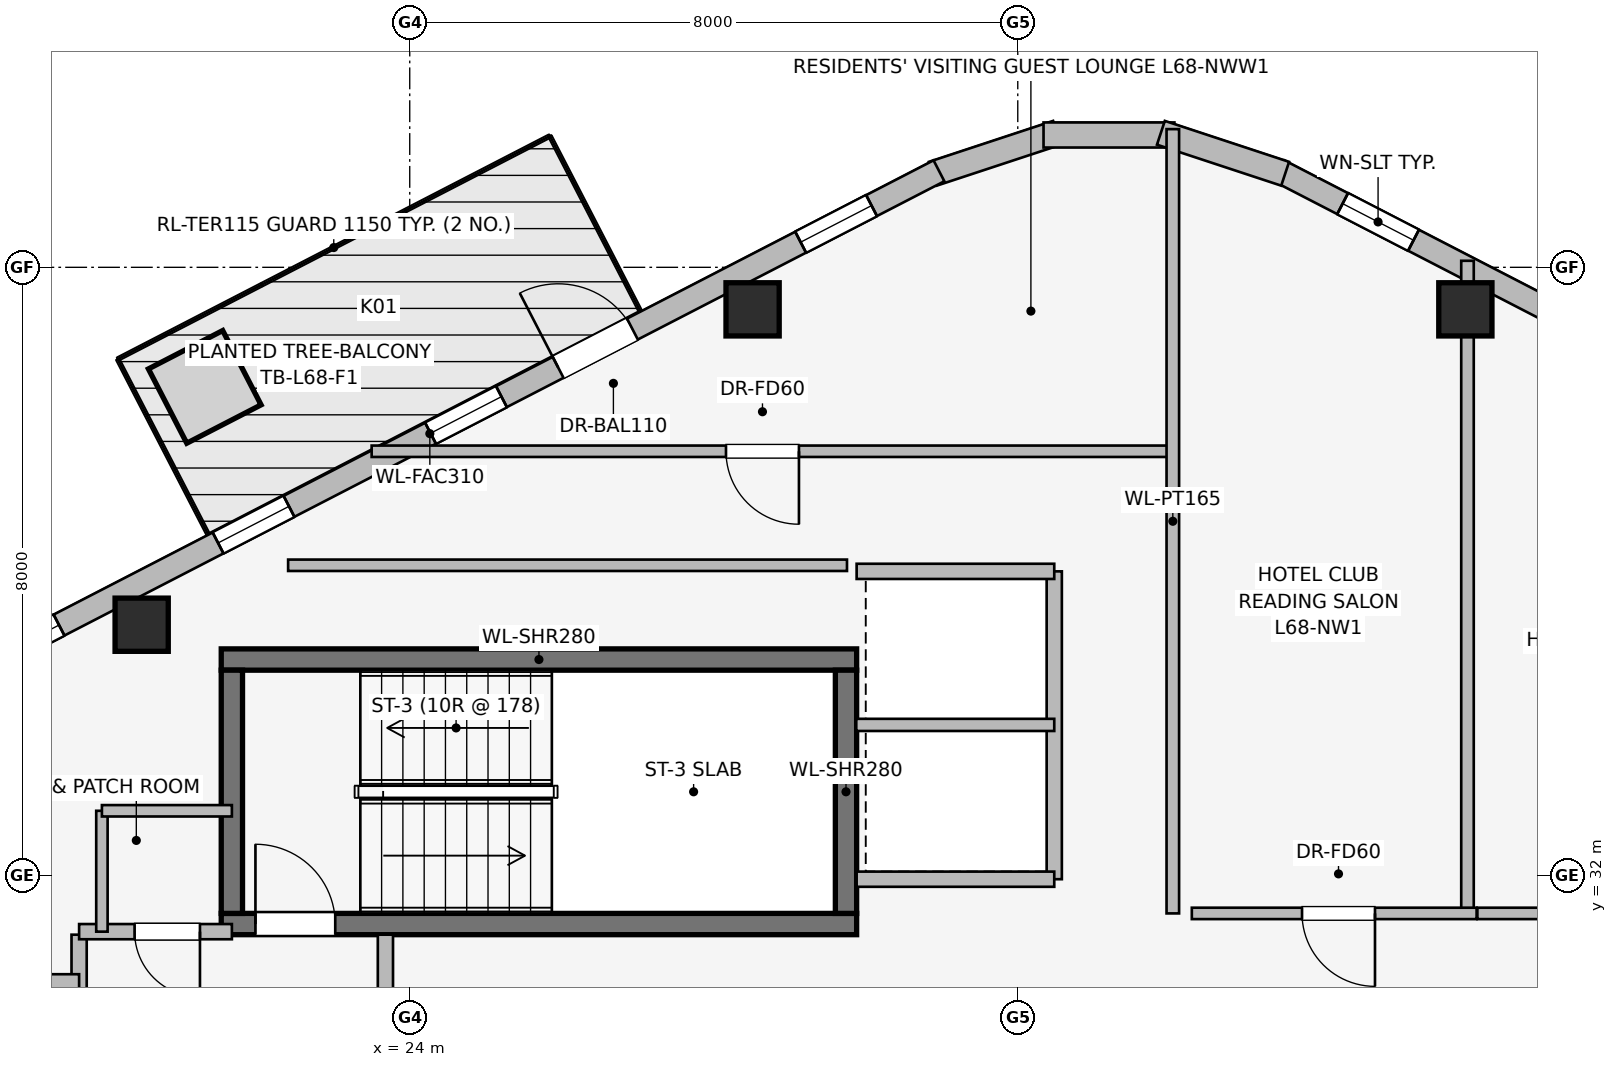
"""IFC4 building model, lengths in metres.
Left out: names, types, materials, properties, quantities, classifications, styles, units other than length and angle.
Written with IfcOpenShell. Run it as: python <this file> out.ifc"""

import sys

from ifc_helpers import new_model, si_unit, direction, frame, frame_2d, origin, origin_2d, place, context, subcontext, project, spatial, rectangle, extrude, element, fill, save


model = new_model("IFC4")
c1 = context("Model", 3, precision=1e-05, world=origin(), true_north=direction((0.0, 1.0)))
c2 = subcontext(c1, "Body", "Model", "MODEL_VIEW")
j1 = project(units=[si_unit("LENGTHUNIT", "METRE"), si_unit("PLANEANGLEUNIT", "RADIAN")], contexts=[c1])
p1 = place(None, origin())
s1 = spatial("IfcSite", under=j1, at=p1, CompositionType="ELEMENT")
p2 = place(p1, origin())
s2 = spatial("IfcBuilding", under=s1, at=p2, CompositionType="ELEMENT")
p3 = place(p2, frame((0.0, 0.0, 249.0)))
s3 = spatial("IfcBuildingStorey", under=s2, at=p3, CompositionType="ELEMENT", Elevation=249.0)
p4 = place(p3, frame((21.52, 31.36, 0.0), z_axis=(0.0, 0.0, 1.0), x_axis=(1.0, 0.0, 0.0)))
e1 = element("IfcWall", 1, at=p4, inside=s3, PredefinedType="SHEAR", context=c2, shape_type="SweptSolid", body=[
    extrude(rectangle(XDim=8.36, YDim=0.28, at=frame_2d((4.18, 0.0))), origin(), (0.0, 0.0, 1.0), 3.55),
])
p5 = place(p4, frame((0.45, 0.0, 0.0)))
e2 = element("IfcOpeningElement", 2, at=p5, cuts=e1, PredefinedType="OPENING", context=c2, shape_type="SweptSolid", body=[
    extrude(rectangle(XDim=1.05, YDim=2.0, at=frame_2d((0.525, 1.0))), frame((0.0, 0.15, 0.0), z_axis=(0.0, -1.0, 0.0), x_axis=(1.0, 0.0, 0.0)), (0.0, 0.0, 1.0), 0.3),
])
p6 = place(p3, frame((29.88, 34.84, 0.0), z_axis=(0.0, 0.0, 1.0), x_axis=(-1.0, 0.0, 0.0)))
e3 = element("IfcWall", 3, at=p6, inside=s3, PredefinedType="SHEAR", context=c2, shape_type="SweptSolid", body=[
    extrude(rectangle(XDim=8.36, YDim=0.28, at=frame_2d((4.18, 0.0))), origin(), (0.0, 0.0, 1.0), 3.55),
])
for number, where, z_axis, x_axis in (
    (4, (21.66, 34.7, 0.0), (0.0, 0.0, 1.0), (0.0, -1.0, 0.0)),
    (5, (29.74, 31.5, 0.0), (0.0, 0.0, 1.0), (0.0, 1.0, 0.0)),
):
    element("IfcWall", number, at=place(p3, frame(where, z_axis=z_axis, x_axis=x_axis)), inside=s3, PredefinedType="SHEAR", context=c2, shape_type="SweptSolid", body=[
        extrude(rectangle(XDim=3.2, YDim=0.28, at=frame_2d((1.6, 0.0))), origin(), (0.0, 0.0, 1.0), 3.55),
    ])
for number, where, z_axis, x_axis in (
    (6, (37.889, 39.447, 0.0), (0.0, 0.0, 1.0), (1.0, 0.0, 0.0)),
    (7, (28.511, 39.447, 0.0), (0.0, 0.0, 1.0), (1.0, 0.0, 0.0)),
    (8, (20.473, 35.298, 0.0), (0.0, 0.0, 1.0), (1.0, 0.0, 0.0)),
):
    element("IfcColumn", number, at=place(p3, frame(where, z_axis=z_axis, x_axis=x_axis)), inside=s3, PredefinedType="COLUMN", context=c2, shape_type="SweptSolid", body=[
        extrude(rectangle(XDim=0.7, YDim=0.7, at=origin_2d()), origin(), (0.0, 0.0, 1.0), 3.55),
    ])
p7 = place(p3, frame((35.437, 41.27, 0.0), z_axis=(0.0, 0.0, 1.0), x_axis=(0.888581481622, -0.458718814218, 0.0)))
e9 = element("IfcWall", 9, at=p7, inside=s3, PredefinedType="STANDARD", context=c2, shape_type="SweptSolid", body=[
    extrude(rectangle(XDim=15.077, YDim=0.31, at=frame_2d((7.539, 0.0))), origin(), (0.0, 0.0, 1.0), 3.29),
])
p8 = place(p7, frame((0.942, 0.0, 0.75)))
e10 = element("IfcOpeningElement", 10, at=p8, cuts=e9, PredefinedType="OPENING", context=c2, shape_type="SweptSolid", body=[
    extrude(rectangle(XDim=1.05, YDim=1.4, at=frame_2d((0.525, 0.7))), frame((0.0, 0.165, 0.0), z_axis=(0.0, -1.0, 0.0), x_axis=(1.0, 0.0, 0.0)), (0.0, 0.0, 1.0), 0.33),
])
p9 = place(p7, frame((4.058, 0.0, 0.75)))
e11 = element("IfcOpeningElement", 11, at=p9, cuts=e9, PredefinedType="OPENING", context=c2, shape_type="SweptSolid", body=[
    extrude(rectangle(XDim=1.05, YDim=1.4, at=frame_2d((0.525, 0.7))), frame((0.0, 0.165, 0.0), z_axis=(0.0, -1.0, 0.0), x_axis=(1.0, 0.0, 0.0)), (0.0, 0.0, 1.0), 0.33),
])
p10 = place(p7, frame((6.153, 0.0, 0.75)))
e12 = element("IfcOpeningElement", 12, at=p10, cuts=e9, PredefinedType="OPENING", context=c2, shape_type="SweptSolid", body=[
    extrude(rectangle(XDim=1.05, YDim=1.4, at=frame_2d((0.525, 0.7))), frame((0.0, 0.165, 0.0), z_axis=(0.0, -1.0, 0.0), x_axis=(1.0, 0.0, 0.0)), (0.0, 0.0, 1.0), 0.33),
])
p11 = place(p7, frame((8.249, 0.0, 0.75)))
e13 = element("IfcOpeningElement", 13, at=p11, cuts=e9, PredefinedType="OPENING", context=c2, shape_type="SweptSolid", body=[
    extrude(rectangle(XDim=1.05, YDim=1.4, at=frame_2d((0.525, 0.7))), frame((0.0, 0.165, 0.0), z_axis=(0.0, -1.0, 0.0), x_axis=(1.0, 0.0, 0.0)), (0.0, 0.0, 1.0), 0.33),
])
p12 = place(p7, frame((13.029, 0.0, 0.75)))
e14 = element("IfcOpeningElement", 14, at=p12, cuts=e9, PredefinedType="OPENING", context=c2, shape_type="SweptSolid", body=[
    extrude(rectangle(XDim=1.05, YDim=1.4, at=frame_2d((0.525, 0.7))), frame((0.0, 0.165, 0.0), z_axis=(0.0, -1.0, 0.0), x_axis=(1.0, 0.0, 0.0)), (0.0, 0.0, 1.0), 0.33),
])
p13 = place(p3, frame((30.882, 41.231, 0.0), z_axis=(0.0, 0.0, 1.0), x_axis=(0.949713440491, 0.313120393699, 0.0)))
e15 = element("IfcWall", 15, at=p13, inside=s3, PredefinedType="STANDARD", context=c2, shape_type="SweptSolid", body=[
    extrude(rectangle(XDim=1.722, YDim=0.33, at=frame_2d((0.861, 0.0))), origin(), (0.0, 0.0, 1.0), 3.29),
])
p14 = place(p3, frame((32.339, 41.741, 0.0), z_axis=(0.0, 0.0, 1.0), x_axis=(1.0, 0.0, 0.0)))
e16 = element("IfcWall", 16, at=p14, inside=s3, PredefinedType="STANDARD", context=c2, shape_type="SweptSolid", body=[
    extrude(rectangle(XDim=1.722, YDim=0.33, at=frame_2d((0.861, 0.0))), origin(), (0.0, 0.0, 1.0), 3.29),
])
p15 = place(p3, frame((33.883, 41.77, 0.0), z_axis=(0.0, 0.0, 1.0), x_axis=(0.949713440491, -0.313120393699, 0.0)))
e17 = element("IfcWall", 17, at=p15, inside=s3, PredefinedType="STANDARD", context=c2, shape_type="SweptSolid", body=[
    extrude(rectangle(XDim=1.722, YDim=0.33, at=frame_2d((0.861, 0.0))), origin(), (0.0, 0.0, 1.0), 3.29),
])
p16 = place(p3, frame((17.566, 34.354, 0.0), z_axis=(0.0, 0.0, 1.0), x_axis=(0.888581481622, 0.458718814218, 0.0)))
e18 = element("IfcWall", 18, at=p16, inside=s3, PredefinedType="STANDARD", context=c2, shape_type="SweptSolid", body=[
    extrude(rectangle(XDim=15.077, YDim=0.31, at=frame_2d((7.539, 0.0))), origin(), (0.0, 0.0, 1.0), 3.29),
])
p17 = place(p16, frame((9.438, 0.0, 0.0)))
e19 = element("IfcOpeningElement", 19, at=p17, cuts=e18, PredefinedType="OPENING", context=c2, shape_type="SweptSolid", body=[
    extrude(rectangle(XDim=1.1, YDim=2.04, at=frame_2d((0.55, 1.02))), frame((0.0, 0.165, 0.0), z_axis=(0.0, -1.0, 0.0), x_axis=(1.0, 0.0, 0.0)), (0.0, 0.0, 1.0), 0.33),
])
p18 = place(p16, frame((0.998, 0.0, 0.75)))
e20 = element("IfcOpeningElement", 20, at=p18, cuts=e18, PredefinedType="OPENING", context=c2, shape_type="SweptSolid", body=[
    extrude(rectangle(XDim=1.05, YDim=1.4, at=frame_2d((0.525, 0.7))), frame((0.0, 0.165, 0.0), z_axis=(0.0, -1.0, 0.0), x_axis=(1.0, 0.0, 0.0)), (0.0, 0.0, 1.0), 0.33),
])
p19 = place(p16, frame((4.403, 0.0, 0.75)))
e21 = element("IfcOpeningElement", 21, at=p19, cuts=e18, PredefinedType="OPENING", context=c2, shape_type="SweptSolid", body=[
    extrude(rectangle(XDim=1.05, YDim=1.4, at=frame_2d((0.525, 0.7))), frame((0.0, 0.165, 0.0), z_axis=(0.0, -1.0, 0.0), x_axis=(1.0, 0.0, 0.0)), (0.0, 0.0, 1.0), 0.33),
])
p20 = place(p16, frame((7.549, 0.0, 0.75)))
e22 = element("IfcOpeningElement", 22, at=p20, cuts=e18, PredefinedType="OPENING", context=c2, shape_type="SweptSolid", body=[
    extrude(rectangle(XDim=1.05, YDim=1.4, at=frame_2d((0.525, 0.7))), frame((0.0, 0.165, 0.0), z_axis=(0.0, -1.0, 0.0), x_axis=(1.0, 0.0, 0.0)), (0.0, 0.0, 1.0), 0.33),
])
p21 = place(p16, frame((13.029, 0.0, 0.75)))
e23 = element("IfcOpeningElement", 23, at=p21, cuts=e18, PredefinedType="OPENING", context=c2, shape_type="SweptSolid", body=[
    extrude(rectangle(XDim=1.05, YDim=1.4, at=frame_2d((0.525, 0.7))), frame((0.0, 0.165, 0.0), z_axis=(0.0, -1.0, 0.0), x_axis=(1.0, 0.0, 0.0)), (0.0, 0.0, 1.0), 0.33),
])
p22 = place(p3, frame((19.65, 25.68, 0.0), z_axis=(0.0, 0.0, 1.0), x_axis=(0.0, 1.0, 0.0)))
e24 = element("IfcWall", 24, at=p22, inside=s3, PredefinedType="PARTITIONING", context=c2, shape_type="SweptSolid", body=[
    extrude(rectangle(XDim=5.54, YDim=0.2, at=frame_2d((2.77, 0.0))), origin(), (0.0, 0.0, 1.0), 3.29),
])
p23 = place(p22, frame((0.62, 0.0, 0.0)))
e25 = element("IfcOpeningElement", 25, at=p23, cuts=e24, PredefinedType="OPENING", context=c2, shape_type="SweptSolid", body=[
    extrude(rectangle(XDim=1.1, YDim=2.2, at=frame_2d((0.55, 1.1))), frame((0.0, 0.11, 0.0), z_axis=(0.0, -1.0, 0.0), x_axis=(1.0, 0.0, 0.0)), (0.0, 0.0, 1.0), 0.22),
])
p24 = place(p22, frame((3.12, 0.0, 0.0)))
e26 = element("IfcOpeningElement", 26, at=p24, cuts=e24, PredefinedType="OPENING", context=c2, shape_type="SweptSolid", body=[
    extrude(rectangle(XDim=1.1, YDim=2.2, at=frame_2d((0.55, 1.1))), frame((0.0, 0.11, 0.0), z_axis=(0.0, -1.0, 0.0), x_axis=(1.0, 0.0, 0.0)), (0.0, 0.0, 1.0), 0.22),
])
p25 = place(p3, frame((23.68, 25.68, 0.0), z_axis=(0.0, 0.0, 1.0), x_axis=(0.0, 1.0, 0.0)))
e27 = element("IfcWall", 27, at=p25, inside=s3, PredefinedType="PARTITIONING", context=c2, shape_type="SweptSolid", body=[
    extrude(rectangle(XDim=5.54, YDim=0.2, at=frame_2d((2.77, 0.0))), origin(), (0.0, 0.0, 1.0), 3.29),
])
p26 = place(p25, frame((1.8, 0.0, 0.0)))
e28 = element("IfcOpeningElement", 28, at=p26, cuts=e27, PredefinedType="OPENING", context=c2, shape_type="SweptSolid", body=[
    extrude(rectangle(XDim=1.05, YDim=2.0, at=frame_2d((0.525, 1.0))), frame((0.0, 0.11, 0.0), z_axis=(0.0, -1.0, 0.0), x_axis=(1.0, 0.0, 0.0)), (0.0, 0.0, 1.0), 0.22),
])
p27 = place(p3, frame((21.66, 31.26, 0.0), z_axis=(0.0, 0.0, 1.0), x_axis=(-1.0, 0.0, 0.0)))
e29 = element("IfcWall", 29, at=p27, inside=s3, PredefinedType="PARTITIONING", context=c2, shape_type="SweptSolid", body=[
    extrude(rectangle(XDim=2.01, YDim=0.2, at=frame_2d((1.005, 0.0))), origin(), (0.0, 0.0, 1.0), 3.29),
])
p28 = place(p27, frame((0.42, 0.0, 0.0)))
e30 = element("IfcOpeningElement", 30, at=p28, cuts=e29, PredefinedType="OPENING", context=c2, shape_type="SweptSolid", body=[
    extrude(rectangle(XDim=0.86, YDim=2.0, at=frame_2d((0.43, 1.0))), frame((0.0, 0.11, 0.0), z_axis=(0.0, -1.0, 0.0), x_axis=(1.0, 0.0, 0.0)), (0.0, 0.0, 1.0), 0.22),
])
p29 = place(p3, frame((19.65, 30.6, 0.0), z_axis=(0.0, 0.0, 1.0), x_axis=(-1.0, 0.0, 0.0)))
e31 = element("IfcWall", 31, at=p29, inside=s3, PredefinedType="PARTITIONING", context=c2, shape_type="SweptSolid", body=[
    extrude(rectangle(XDim=2.5, YDim=0.2, at=frame_2d((1.25, 0.0))), origin(), (0.0, 0.0, 1.0), 2.19),
])
p30 = place(p3, frame((32.48, 31.95, 0.0), z_axis=(0.0, 0.0, 1.0), x_axis=(0.0, 1.0, 0.0)))
e32 = element("IfcWall", 32, at=p30, inside=s3, PredefinedType="PARTITIONING", context=c2, shape_type="SweptSolid", body=[
    extrude(rectangle(XDim=4.05, YDim=0.2, at=frame_2d((2.025, 0.0))), origin(), (0.0, 0.0, 1.0), 3.29),
])
for number, where, z_axis, x_axis in (
    (33, (29.88, 36.0, 0.0), (0.0, 0.0, 1.0), (1.0, 0.0, 0.0)),
    (34, (32.48, 31.95, 0.0), (0.0, 0.0, 1.0), (-1.0, 0.0, 0.0)),
):
    element("IfcWall", number, at=place(p3, frame(where, z_axis=z_axis, x_axis=x_axis)), inside=s3, PredefinedType="PARTITIONING", context=c2, shape_type="SweptSolid", body=[
        extrude(rectangle(XDim=2.6, YDim=0.2, at=frame_2d((1.3, 0.0))), origin(), (0.0, 0.0, 1.0), 3.29),
    ])
p31 = place(p3, frame((29.875, 33.98, 0.0), z_axis=(0.0, 0.0, 1.0), x_axis=(1.0, 0.0, 0.0)))
e35 = element("IfcWall", 35, at=p31, inside=s3, PredefinedType="PARTITIONING", context=c2, shape_type="SweptSolid", body=[
    extrude(rectangle(XDim=2.605, YDim=0.16, at=frame_2d((1.302, 0.0))), origin(), (0.0, 0.0, 1.0), 3.29),
])
p32 = place(p3, frame((19.95, 32.85, 0.0), z_axis=(0.0, 0.0, 1.0), x_axis=(0.0, -1.0, 0.0)))
e36 = element("IfcWall", 36, at=p32, inside=s3, PredefinedType="PARTITIONING", context=c2, shape_type="SweptSolid", body=[
    extrude(rectangle(XDim=1.59, YDim=0.15, at=frame_2d((0.795, 0.0))), origin(), (0.0, 0.0, 1.0), 3.29),
])
p33 = place(p3, frame((21.66, 32.85, 0.0), z_axis=(0.0, 0.0, 1.0), x_axis=(-1.0, 0.0, 0.0)))
e37 = element("IfcWall", 37, at=p33, inside=s3, PredefinedType="PARTITIONING", context=c2, shape_type="SweptSolid", body=[
    extrude(rectangle(XDim=1.71, YDim=0.15, at=frame_2d((0.855, 0.0))), origin(), (0.0, 0.0, 1.0), 3.29),
])
p34 = place(p3, frame((34.0, 37.58, 0.0), z_axis=(0.0, 0.0, 1.0), x_axis=(-1.0, 0.0, 0.0)))
e38 = element("IfcWall", 38, at=p34, inside=s3, PredefinedType="PARTITIONING", context=c2, shape_type="SweptSolid", body=[
    extrude(rectangle(XDim=10.501, YDim=0.15, at=frame_2d((5.25, 0.0))), origin(), (0.0, 0.0, 1.0), 2.682),
])
p35 = place(p34, frame((4.879, 0.0, 0.0)))
e39 = element("IfcOpeningElement", 39, at=p35, cuts=e38, PredefinedType="OPENING", context=c2, shape_type="SweptSolid", body=[
    extrude(rectangle(XDim=0.96, YDim=2.0, at=frame_2d((0.48, 1.0))), frame((0.0, 0.085, 0.0), z_axis=(0.0, -1.0, 0.0), x_axis=(1.0, 0.0, 0.0)), (0.0, 0.0, 1.0), 0.17),
])
p36 = place(p3, frame((34.04, 31.5, 0.0), z_axis=(0.0, 0.0, 1.0), x_axis=(0.0, 1.0, 0.0)))
e40 = element("IfcWall", 40, at=p36, inside=s3, PredefinedType="PARTITIONING", context=c2, shape_type="SweptSolid", body=[
    extrude(rectangle(XDim=10.318, YDim=0.165, at=frame_2d((5.159, 0.0))), origin(), (0.0, 0.0, 1.0), 3.29),
])
p37 = place(p3, frame((37.917, 31.51, 0.0), z_axis=(0.0, 0.0, 1.0), x_axis=(0.0, 1.0, 0.0)))
e41 = element("IfcWall", 41, at=p37, inside=s3, PredefinedType="PARTITIONING", context=c2, shape_type="SweptSolid", body=[
    extrude(rectangle(XDim=8.576, YDim=0.165, at=frame_2d((4.288, 0.0))), origin(), (0.0, 0.0, 1.0), 2.679),
])
p38 = place(p3, frame((38.037, 31.5, 0.0), z_axis=(0.0, 0.0, 1.0), x_axis=(-1.0, 0.0, 0.0)))
e42 = element("IfcWall", 42, at=p38, inside=s3, PredefinedType="PARTITIONING", context=c2, shape_type="SweptSolid", body=[
    extrude(rectangle(XDim=3.747, YDim=0.15, at=frame_2d((1.874, 0.0))), origin(), (0.0, 0.0, 1.0), 3.29),
])
p39 = place(p38, frame((1.337, 0.0, 0.0)))
e43 = element("IfcOpeningElement", 43, at=p39, cuts=e42, PredefinedType="OPENING", context=c2, shape_type="SweptSolid", body=[
    extrude(rectangle(XDim=0.96, YDim=2.0, at=frame_2d((0.48, 1.0))), frame((0.0, 0.085, 0.0), z_axis=(0.0, -1.0, 0.0), x_axis=(1.0, 0.0, 0.0)), (0.0, 0.0, 1.0), 0.17),
])
p40 = place(p3, frame((41.45, 31.5, 0.0), z_axis=(0.0, 0.0, 1.0), x_axis=(-1.0, 0.0, 0.0)))
e44 = element("IfcWall", 44, at=p40, inside=s3, PredefinedType="PARTITIONING", context=c2, shape_type="SweptSolid", body=[
    extrude(rectangle(XDim=3.403, YDim=0.15, at=frame_2d((1.701, 0.0))), origin(), (0.0, 0.0, 1.0), 3.29),
])
p41 = place(p40, frame((1.399, 0.0, 0.0)))
e45 = element("IfcOpeningElement", 45, at=p41, cuts=e44, PredefinedType="OPENING", context=c2, shape_type="SweptSolid", body=[
    extrude(rectangle(XDim=0.96, YDim=2.0, at=frame_2d((0.48, 1.0))), frame((0.0, 0.085, 0.0), z_axis=(0.0, -1.0, 0.0), x_axis=(1.0, 0.0, 0.0)), (0.0, 0.0, 1.0), 0.17),
])
p42 = place(p3, frame((29.753, 36.08, 0.0), z_axis=(0.0, 0.0, 1.0), x_axis=(-1.0, 0.0, 0.0)))
e46 = element("IfcWall", 46, at=p42, inside=s3, PredefinedType="PARTITIONING", context=c2, shape_type="SweptSolid", body=[
    extrude(rectangle(XDim=7.353, YDim=0.15, at=frame_2d((3.677, 0.0))), origin(), (0.0, 0.0, 1.0), 2.682),
])
p43 = place(p8, origin())
e47 = element("IfcWindow", 47, at=p43, inside=s3, PartitioningType="SINGLE_PANEL", PredefinedType="WINDOW", context=c2, shape_type="SweptSolid", body=[
    extrude(rectangle(XDim=1.05, YDim=1.4, at=frame_2d((0.525, 0.7))), frame((0.0, 0.03, 0.0), z_axis=(0.0, -1.0, 0.0), x_axis=(1.0, 0.0, 0.0)), (0.0, 0.0, 1.0), 0.06),
])
fill(e10, e47)
p44 = place(p17, origin())
e48 = element("IfcDoor", 48, at=p44, inside=s3, OperationType="SINGLE_SWING_LEFT", PredefinedType="DOOR", context=c2, shape_type="SweptSolid", body=[
    extrude(rectangle(XDim=1.1, YDim=2.04, at=frame_2d((0.55, 1.02))), frame((0.0, 0.025, 0.0), z_axis=(0.0, -1.0, 0.0), x_axis=(1.0, 0.0, 0.0)), (0.0, 0.0, 1.0), 0.05),
])
fill(e19, e48)
p45 = place(p18, origin())
e49 = element("IfcWindow", 49, at=p45, inside=s3, PartitioningType="SINGLE_PANEL", PredefinedType="WINDOW", context=c2, shape_type="SweptSolid", body=[
    extrude(rectangle(XDim=1.05, YDim=1.4, at=frame_2d((0.525, 0.7))), frame((0.0, 0.03, 0.0), z_axis=(0.0, -1.0, 0.0), x_axis=(1.0, 0.0, 0.0)), (0.0, 0.0, 1.0), 0.06),
])
fill(e20, e49)
p46 = place(p19, origin())
e50 = element("IfcWindow", 50, at=p46, inside=s3, PartitioningType="SINGLE_PANEL", PredefinedType="WINDOW", context=c2, shape_type="SweptSolid", body=[
    extrude(rectangle(XDim=1.05, YDim=1.4, at=frame_2d((0.525, 0.7))), frame((0.0, 0.03, 0.0), z_axis=(0.0, -1.0, 0.0), x_axis=(1.0, 0.0, 0.0)), (0.0, 0.0, 1.0), 0.06),
])
fill(e21, e50)
p47 = place(p20, origin())
e51 = element("IfcWindow", 51, at=p47, inside=s3, PartitioningType="SINGLE_PANEL", PredefinedType="WINDOW", context=c2, shape_type="SweptSolid", body=[
    extrude(rectangle(XDim=1.05, YDim=1.4, at=frame_2d((0.525, 0.7))), frame((0.0, 0.03, 0.0), z_axis=(0.0, -1.0, 0.0), x_axis=(1.0, 0.0, 0.0)), (0.0, 0.0, 1.0), 0.06),
])
fill(e22, e51)
p48 = place(p21, origin())
e52 = element("IfcWindow", 52, at=p48, inside=s3, PartitioningType="SINGLE_PANEL", PredefinedType="WINDOW", context=c2, shape_type="SweptSolid", body=[
    extrude(rectangle(XDim=1.05, YDim=1.4, at=frame_2d((0.525, 0.7))), frame((0.0, 0.03, 0.0), z_axis=(0.0, -1.0, 0.0), x_axis=(1.0, 0.0, 0.0)), (0.0, 0.0, 1.0), 0.06),
])
fill(e23, e52)
p49 = place(p5, origin())
e53 = element("IfcDoor", 53, at=p49, inside=s3, OperationType="SINGLE_SWING_LEFT", PredefinedType="DOOR", context=c2, shape_type="SweptSolid", body=[
    extrude(rectangle(XDim=1.05, YDim=2.0, at=frame_2d((0.525, 1.0))), frame((0.0, 0.025, 0.0), z_axis=(0.0, -1.0, 0.0), x_axis=(1.0, 0.0, 0.0)), (0.0, 0.0, 1.0), 0.05),
])
fill(e2, e53)
p50 = place(p28, origin())
e54 = element("IfcDoor", 54, at=p50, inside=s3, OperationType="SINGLE_SWING_LEFT", PredefinedType="DOOR", context=c2, shape_type="SweptSolid", body=[
    extrude(rectangle(XDim=0.86, YDim=2.0, at=frame_2d((0.43, 1.0))), frame((0.0, 0.025, 0.0), z_axis=(0.0, -1.0, 0.0), x_axis=(1.0, 0.0, 0.0)), (0.0, 0.0, 1.0), 0.05),
])
fill(e30, e54)
p51 = place(p35, origin())
e55 = element("IfcDoor", 55, at=p51, inside=s3, OperationType="SINGLE_SWING_LEFT", PredefinedType="DOOR", context=c2, shape_type="SweptSolid", body=[
    extrude(rectangle(XDim=0.96, YDim=2.0, at=frame_2d((0.48, 1.0))), frame((0.0, 0.025, 0.0), z_axis=(0.0, -1.0, 0.0), x_axis=(1.0, 0.0, 0.0)), (0.0, 0.0, 1.0), 0.05),
])
fill(e39, e55)
p52 = place(p39, origin())
e56 = element("IfcDoor", 56, at=p52, inside=s3, OperationType="SINGLE_SWING_LEFT", PredefinedType="DOOR", context=c2, shape_type="SweptSolid", body=[
    extrude(rectangle(XDim=0.96, YDim=2.0, at=frame_2d((0.48, 1.0))), frame((0.0, 0.025, 0.0), z_axis=(0.0, -1.0, 0.0), x_axis=(1.0, 0.0, 0.0)), (0.0, 0.0, 1.0), 0.05),
])
fill(e43, e56)
save(model, sys.argv[1])
